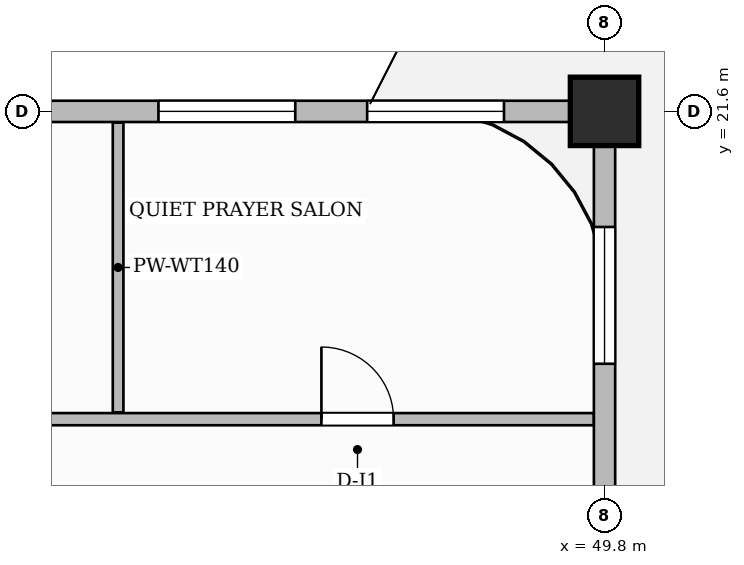
"""IFC4 building model, lengths in metres.
Left out: names, types, materials, properties, quantities, classifications, styles, units other than length and angle.
Written with IfcOpenShell. Run it as: python <this file> out.ifc"""

import sys

from ifc_helpers import new_model, si_unit, direction, frame, frame_2d, origin, origin_2d, place, context, subcontext, project, spatial, rectangle, extrude, source, transform, mapped, element, fill, save


model = new_model("IFC4")
c1 = context("Model", 3, precision=1e-05, world=origin(), true_north=direction((0.0, 1.0)))
c2 = subcontext(c1, "Body", "Model", "MODEL_VIEW")
j1 = project(units=[si_unit("LENGTHUNIT", "METRE"), si_unit("PLANEANGLEUNIT", "RADIAN")], contexts=[c1])
p1 = place(None, origin())
s1 = spatial("IfcSite", under=j1, at=p1, CompositionType="ELEMENT")
p2 = place(p1, origin())
s2 = spatial("IfcBuilding", under=s1, at=p2, CompositionType="ELEMENT")
p3 = place(p2, frame((0.0, 0.0, 236.55)))
s3 = spatial("IfcBuildingStorey", under=s2, at=p3, CompositionType="ELEMENT", Elevation=236.55)
m1 = source(origin(), c2, "Body", "SweptSolid", [
    extrude(rectangle(XDim=0.9, YDim=0.9, at=origin_2d()), origin(), (0.0, 0.0, 1.0), 3.85),
])
p4 = place(p3, frame((49.8, 21.6, 0.0), z_axis=(0.0, 0.0, 1.0), x_axis=(1.0, 0.0, 0.0)))
e1 = element("IfcColumn", 1, at=p4, inside=s3, PredefinedType="COLUMN", context=c2, shape_type="MappedRepresentation", body=[
    mapped(m1, transform((0.0, 0.0, 0.0), scale=1.0)),
])
p5 = place(p3, frame((30.29, 17.55, 0.0), z_axis=(0.0, 0.0, 1.0), x_axis=(1.0, 0.0, 0.0)))
e2 = element("IfcWall", 2, at=p5, inside=s3, PredefinedType="PARTITIONING", context=c2, shape_type="SweptSolid", body=[
    extrude(rectangle(XDim=19.37, YDim=0.16, at=frame_2d((9.685, 0.0))), origin(), (0.0, 0.0, 1.0), 3.6),
])
p6 = place(p5, frame((1.235, 0.0, 0.0)))
e3 = element("IfcOpeningElement", 3, at=p6, cuts=e2, PredefinedType="OPENING", context=c2, shape_type="SweptSolid", body=[
    extrude(rectangle(XDim=0.85, YDim=2.1, at=frame_2d((0.425, 1.05))), frame((0.0, 0.09, 0.0), z_axis=(0.0, -1.0, 0.0), x_axis=(1.0, 0.0, 0.0)), (0.0, 0.0, 1.0), 0.18),
])
p7 = place(p5, frame((7.56, 0.0, 0.0)))
e4 = element("IfcOpeningElement", 4, at=p7, cuts=e2, PredefinedType="OPENING", context=c2, shape_type="SweptSolid", body=[
    extrude(rectangle(XDim=1.4, YDim=2.35, at=frame_2d((0.7, 1.175))), frame((0.0, 0.09, 0.0), z_axis=(0.0, -1.0, 0.0), x_axis=(1.0, 0.0, 0.0)), (0.0, 0.0, 1.0), 0.18),
])
p8 = place(p5, frame((15.785, 0.0, 0.0)))
e5 = element("IfcOpeningElement", 5, at=p8, cuts=e2, PredefinedType="OPENING", context=c2, shape_type="SweptSolid", body=[
    extrude(rectangle(XDim=0.95, YDim=2.15, at=frame_2d((0.475, 1.075))), frame((0.0, 0.09, 0.0), z_axis=(0.0, -1.0, 0.0), x_axis=(1.0, 0.0, 0.0)), (0.0, 0.0, 1.0), 0.18),
])
p9 = place(p3, frame((43.4, 17.64, 0.0), z_axis=(0.0, 0.0, 1.0), x_axis=(0.0, 1.0, 0.0)))
e6 = element("IfcWall", 6, at=p9, inside=s3, PredefinedType="PARTITIONING", context=c2, shape_type="SweptSolid", body=[
    extrude(rectangle(XDim=3.812, YDim=0.14, at=frame_2d((1.906, 0.0))), origin(), (0.0, 0.0, 1.0), 3.6),
])
p10 = place(p3, frame((49.8, 14.62, 0.0), z_axis=(0.0, 0.0, 1.0), x_axis=(0.0, 1.0, 0.0)))
e7 = element("IfcWall", 7, at=p10, inside=s3, PredefinedType="SOLIDWALL", context=c2, shape_type="SweptSolid", body=[
    extrude(rectangle(XDim=6.93, YDim=0.28, at=frame_2d((3.465, 0.0))), origin(), (0.0, 0.0, 1.0), 3.135),
])
p11 = place(p10, frame((0.42, 0.0, 0.0)))
e8 = element("IfcOpeningElement", 8, at=p11, cuts=e7, PredefinedType="OPENING", context=c2, shape_type="SweptSolid", body=[
    extrude(rectangle(XDim=1.2, YDim=2.2, at=frame_2d((0.6, 1.1))), frame((0.0, 0.15, 0.0), z_axis=(0.0, -1.0, 0.0), x_axis=(1.0, 0.0, 0.0)), (0.0, 0.0, 1.0), 0.3),
])
p12 = place(p10, frame((3.659, 0.0, 0.8)))
e9 = element("IfcOpeningElement", 9, at=p12, cuts=e7, PredefinedType="OPENING", context=c2, shape_type="SweptSolid", body=[
    extrude(rectangle(XDim=1.8, YDim=1.85, at=frame_2d((0.9, 0.925))), frame((0.0, 0.15, 0.0), z_axis=(0.0, -1.0, 0.0), x_axis=(1.0, 0.0, 0.0)), (0.0, 0.0, 1.0), 0.3),
])
p13 = place(p3, frame((14.4, 21.6, 0.0), z_axis=(0.0, 0.0, 1.0), x_axis=(1.0, 0.0, 0.0)))
e10 = element("IfcWall", 10, at=p13, inside=s3, PredefinedType="SOLIDWALL", context=c2, shape_type="SweptSolid", body=[
    extrude(rectangle(XDim=35.4, YDim=0.28, at=frame_2d((17.7, 0.0))), origin(), (0.0, 0.0, 1.0), 3.135),
])
p14 = place(p13, frame((0.85, 0.0, 0.0)))
e11 = element("IfcOpeningElement", 11, at=p14, cuts=e10, PredefinedType="OPENING", context=c2, shape_type="SweptSolid", body=[
    extrude(rectangle(XDim=1.2, YDim=2.2, at=frame_2d((0.6, 1.1))), frame((0.0, 0.15, 0.0), z_axis=(0.0, -1.0, 0.0), x_axis=(1.0, 0.0, 0.0)), (0.0, 0.0, 1.0), 0.3),
])
p15 = place(p13, frame((3.475, 0.0, 0.8)))
e12 = element("IfcOpeningElement", 12, at=p15, cuts=e10, PredefinedType="OPENING", context=c2, shape_type="SweptSolid", body=[
    extrude(rectangle(XDim=1.8, YDim=1.85, at=frame_2d((0.9, 0.925))), frame((0.0, 0.15, 0.0), z_axis=(0.0, -1.0, 0.0), x_axis=(1.0, 0.0, 0.0)), (0.0, 0.0, 1.0), 0.3),
])
p16 = place(p13, frame((8.181, 0.0, 0.8)))
e13 = element("IfcOpeningElement", 13, at=p16, cuts=e10, PredefinedType="OPENING", context=c2, shape_type="SweptSolid", body=[
    extrude(rectangle(XDim=0.95, YDim=1.75, at=frame_2d((0.475, 0.875))), frame((0.0, 0.15, 0.0), z_axis=(0.0, -1.0, 0.0), x_axis=(1.0, 0.0, 0.0)), (0.0, 0.0, 1.0), 0.3),
])
p17 = place(p13, frame((10.564, 0.0, 0.8)))
e14 = element("IfcOpeningElement", 14, at=p17, cuts=e10, PredefinedType="OPENING", context=c2, shape_type="SweptSolid", body=[
    extrude(rectangle(XDim=1.8, YDim=1.85, at=frame_2d((0.9, 0.925))), frame((0.0, 0.15, 0.0), z_axis=(0.0, -1.0, 0.0), x_axis=(1.0, 0.0, 0.0)), (0.0, 0.0, 1.0), 0.3),
])
p18 = place(p13, frame((16.651, 0.0, 0.8)))
e15 = element("IfcOpeningElement", 15, at=p18, cuts=e10, PredefinedType="OPENING", context=c2, shape_type="SweptSolid", body=[
    extrude(rectangle(XDim=1.8, YDim=1.85, at=frame_2d((0.9, 0.925))), frame((0.0, 0.15, 0.0), z_axis=(0.0, -1.0, 0.0), x_axis=(1.0, 0.0, 0.0)), (0.0, 0.0, 1.0), 0.3),
])
p19 = place(p13, frame((21.725, 0.0, 0.8)))
e16 = element("IfcOpeningElement", 16, at=p19, cuts=e10, PredefinedType="OPENING", context=c2, shape_type="SweptSolid", body=[
    extrude(rectangle(XDim=1.8, YDim=1.85, at=frame_2d((0.9, 0.925))), frame((0.0, 0.15, 0.0), z_axis=(0.0, -1.0, 0.0), x_axis=(1.0, 0.0, 0.0)), (0.0, 0.0, 1.0), 0.3),
])
p20 = place(p13, frame((24.475, 0.0, 0.8)))
e17 = element("IfcOpeningElement", 17, at=p20, cuts=e10, PredefinedType="OPENING", context=c2, shape_type="SweptSolid", body=[
    extrude(rectangle(XDim=1.8, YDim=1.85, at=frame_2d((0.9, 0.925))), frame((0.0, 0.15, 0.0), z_axis=(0.0, -1.0, 0.0), x_axis=(1.0, 0.0, 0.0)), (0.0, 0.0, 1.0), 0.3),
])
p21 = place(p13, frame((29.531, 0.0, 0.8)))
e18 = element("IfcOpeningElement", 18, at=p21, cuts=e10, PredefinedType="OPENING", context=c2, shape_type="SweptSolid", body=[
    extrude(rectangle(XDim=1.8, YDim=1.85, at=frame_2d((0.9, 0.925))), frame((0.0, 0.15, 0.0), z_axis=(0.0, -1.0, 0.0), x_axis=(1.0, 0.0, 0.0)), (0.0, 0.0, 1.0), 0.3),
])
p22 = place(p13, frame((32.277, 0.0, 0.8)))
e19 = element("IfcOpeningElement", 19, at=p22, cuts=e10, PredefinedType="OPENING", context=c2, shape_type="SweptSolid", body=[
    extrude(rectangle(XDim=1.8, YDim=1.85, at=frame_2d((0.9, 0.925))), frame((0.0, 0.15, 0.0), z_axis=(0.0, -1.0, 0.0), x_axis=(1.0, 0.0, 0.0)), (0.0, 0.0, 1.0), 0.3),
])
m2 = source(origin(), c2, "Body", "SweptSolid", [
    extrude(rectangle(XDim=0.95, YDim=2.15, at=frame_2d((0.475, 1.075))), frame((0.0, 0.025, 0.0), z_axis=(0.0, -1.0, 0.0), x_axis=(1.0, 0.0, 0.0)), (0.0, 0.0, 1.0), 0.05),
])
p23 = place(p8, origin())
e20 = element("IfcDoor", 20, at=p23, inside=s3, OperationType="SINGLE_SWING_LEFT", PredefinedType="DOOR", context=c2, shape_type="MappedRepresentation", body=[
    mapped(m2, transform((0.0, 0.0, 0.0), scale=1.0)),
])
fill(e5, e20)
m3 = source(origin(), c2, "Body", "SweptSolid", [
    extrude(rectangle(XDim=1.8, YDim=1.85, at=frame_2d((0.9, 0.925))), frame((0.0, 0.03, 0.0), z_axis=(0.0, -1.0, 0.0), x_axis=(1.0, 0.0, 0.0)), (0.0, 0.0, 1.0), 0.06),
])
p24 = place(p12, origin())
e21 = element("IfcWindow", 21, at=p24, inside=s3, PartitioningType="DOUBLE_PANEL_VERTICAL", PredefinedType="WINDOW", context=c2, shape_type="MappedRepresentation", body=[
    mapped(m3, transform((0.0, 0.0, 0.0), scale=1.0)),
])
fill(e9, e21)
p25 = place(p21, origin())
e22 = element("IfcWindow", 22, at=p25, inside=s3, PartitioningType="DOUBLE_PANEL_VERTICAL", PredefinedType="WINDOW", context=c2, shape_type="MappedRepresentation", body=[
    mapped(m3, transform((0.0, 0.0, 0.0), scale=1.0)),
])
fill(e18, e22)
p26 = place(p22, origin())
e23 = element("IfcWindow", 23, at=p26, inside=s3, PartitioningType="DOUBLE_PANEL_VERTICAL", PredefinedType="WINDOW", context=c2, shape_type="MappedRepresentation", body=[
    mapped(m3, transform((0.0, 0.0, 0.0), scale=1.0)),
])
fill(e19, e23)
save(model, sys.argv[1])
